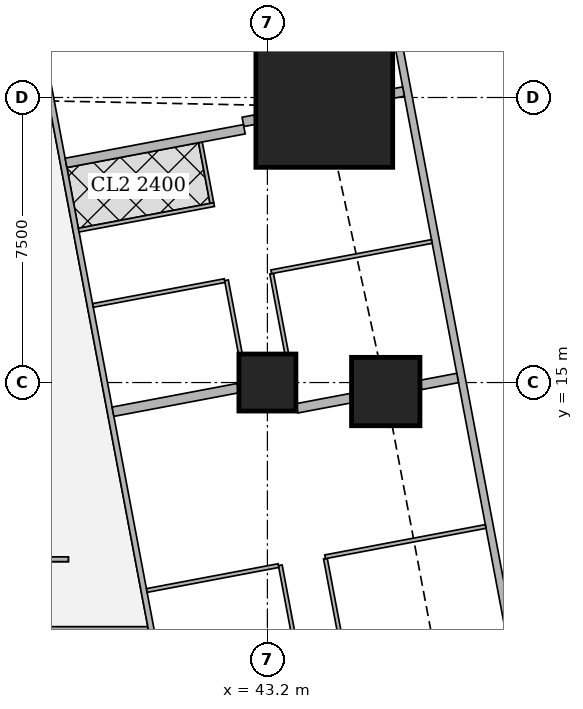
"""IFC4 building model, lengths in metres.
Left out: names, types, materials, properties, quantities, classifications, styles, units other than length and angle.
Written with IfcOpenShell. Run it as: python <this file> out.ifc"""

import sys

from ifc_helpers import new_model, si_unit, direction, frame, frame_2d, origin, origin_2d, place, context, subcontext, project, spatial, rectangle, extrude, element, fill, save


model = new_model("IFC4")
c1 = context("Model", 3, precision=1e-05, world=origin(), true_north=direction((0.0, 1.0)))
c2 = subcontext(c1, "Body", "Model", "MODEL_VIEW")
j1 = project(units=[si_unit("LENGTHUNIT", "METRE"), si_unit("PLANEANGLEUNIT", "RADIAN")], contexts=[c1])
p1 = place(None, origin())
s1 = spatial("IfcSite", under=j1, at=p1, CompositionType="ELEMENT")
p2 = place(p1, origin())
s2 = spatial("IfcBuilding", under=s1, at=p2, CompositionType="ELEMENT")
p3 = place(p2, frame((0.0, 0.0, 139.55)))
s3 = spatial("IfcBuildingStorey", under=s2, at=p3, CompositionType="ELEMENT", Elevation=139.55)
p4 = place(p3, frame((43.2, 15.0, 0.0), z_axis=(0.0, 0.0, 1.0), x_axis=(1.0, 0.0, 0.0)))
e1 = element("IfcColumn", 1, at=p4, inside=s3, PredefinedType="COLUMN", context=c2, shape_type="SweptSolid", body=[
    extrude(rectangle(XDim=1.5, YDim=1.5, at=origin_2d()), origin(), (0.0, 0.0, 1.0), 3.75),
])
p5 = place(p3, frame((46.314, 14.763, 0.0), z_axis=(0.0, 0.0, 1.0), x_axis=(1.0, 0.0, 0.0)))
e2 = element("IfcColumn", 2, at=p5, inside=s3, PredefinedType="COLUMN", context=c2, shape_type="SweptSolid", body=[
    extrude(rectangle(XDim=1.8, YDim=1.8, at=origin_2d()), origin(), (0.0, 0.0, 1.0), 3.75),
])
p6 = place(p3, frame((44.697, 22.263, 0.0), z_axis=(0.0, 0.0, 1.0), x_axis=(1.0, 0.0, 0.0)))
e3 = element("IfcColumn", 3, at=p6, inside=s3, PredefinedType="COLUMN", context=c2, shape_type="SweptSolid", body=[
    extrude(rectangle(XDim=3.6, YDim=3.2, at=origin_2d()), origin(), (0.0, 0.0, 1.0), 3.75),
])
p7 = place(p3, frame((50.653, 2.703, 0.0), z_axis=(0.0, 0.0, 1.0), x_axis=(-0.185612026696, 0.982623109613, 0.0)))
e4 = element("IfcWall", 4, at=p7, inside=s3, PredefinedType="SOLIDWALL", context=c2, shape_type="SweptSolid", body=[
    extrude(rectangle(XDim=41.393, YDim=0.2, at=frame_2d((20.697, 0.0))), origin(), (0.0, 0.0, 1.0), 3.5),
])
p8 = place(p7, frame((1.633, 0.0, 0.9)))
e5 = element("IfcOpeningElement", 5, at=p8, cuts=e4, PredefinedType="OPENING", context=c2, shape_type="SweptSolid", body=[
    extrude(rectangle(XDim=1.8, YDim=1.5, at=frame_2d((0.9, 0.75))), frame((0.0, 0.11, 0.0), z_axis=(0.0, -1.0, 0.0), x_axis=(1.0, 0.0, 0.0)), (0.0, 0.0, 1.0), 0.22),
])
p9 = place(p7, frame((6.032, 0.0, 0.9)))
e6 = element("IfcOpeningElement", 6, at=p9, cuts=e4, PredefinedType="OPENING", context=c2, shape_type="SweptSolid", body=[
    extrude(rectangle(XDim=1.8, YDim=1.5, at=frame_2d((0.9, 0.75))), frame((0.0, 0.11, 0.0), z_axis=(0.0, -1.0, 0.0), x_axis=(1.0, 0.0, 0.0)), (0.0, 0.0, 1.0), 0.22),
])
p10 = place(p7, frame((9.848, 0.0, 0.9)))
e7 = element("IfcOpeningElement", 7, at=p10, cuts=e4, PredefinedType="OPENING", context=c2, shape_type="SweptSolid", body=[
    extrude(rectangle(XDim=1.8, YDim=1.5, at=frame_2d((0.9, 0.75))), frame((0.0, 0.11, 0.0), z_axis=(0.0, -1.0, 0.0), x_axis=(1.0, 0.0, 0.0)), (0.0, 0.0, 1.0), 0.22),
])
p11 = place(p7, frame((13.664, 0.0, 0.9)))
e8 = element("IfcOpeningElement", 8, at=p11, cuts=e4, PredefinedType="OPENING", context=c2, shape_type="SweptSolid", body=[
    extrude(rectangle(XDim=1.8, YDim=1.5, at=frame_2d((0.9, 0.75))), frame((0.0, 0.11, 0.0), z_axis=(0.0, -1.0, 0.0), x_axis=(1.0, 0.0, 0.0)), (0.0, 0.0, 1.0), 0.22),
])
p12 = place(p7, frame((17.481, 0.0, 0.9)))
e9 = element("IfcOpeningElement", 9, at=p12, cuts=e4, PredefinedType="OPENING", context=c2, shape_type="SweptSolid", body=[
    extrude(rectangle(XDim=1.8, YDim=1.5, at=frame_2d((0.9, 0.75))), frame((0.0, 0.11, 0.0), z_axis=(0.0, -1.0, 0.0), x_axis=(1.0, 0.0, 0.0)), (0.0, 0.0, 1.0), 0.22),
])
p13 = place(p7, frame((21.297, 0.0, 0.9)))
e10 = element("IfcOpeningElement", 10, at=p13, cuts=e4, PredefinedType="OPENING", context=c2, shape_type="SweptSolid", body=[
    extrude(rectangle(XDim=1.8, YDim=1.5, at=frame_2d((0.9, 0.75))), frame((0.0, 0.11, 0.0), z_axis=(0.0, -1.0, 0.0), x_axis=(1.0, 0.0, 0.0)), (0.0, 0.0, 1.0), 0.22),
])
p14 = place(p7, frame((25.113, 0.0, 0.9)))
e11 = element("IfcOpeningElement", 11, at=p14, cuts=e4, PredefinedType="OPENING", context=c2, shape_type="SweptSolid", body=[
    extrude(rectangle(XDim=1.8, YDim=1.5, at=frame_2d((0.9, 0.75))), frame((0.0, 0.11, 0.0), z_axis=(0.0, -1.0, 0.0), x_axis=(1.0, 0.0, 0.0)), (0.0, 0.0, 1.0), 0.22),
])
p15 = place(p7, frame((28.93, 0.0, 0.9)))
e12 = element("IfcOpeningElement", 12, at=p15, cuts=e4, PredefinedType="OPENING", context=c2, shape_type="SweptSolid", body=[
    extrude(rectangle(XDim=1.8, YDim=1.5, at=frame_2d((0.9, 0.75))), frame((0.0, 0.11, 0.0), z_axis=(0.0, -1.0, 0.0), x_axis=(1.0, 0.0, 0.0)), (0.0, 0.0, 1.0), 0.22),
])
p16 = place(p7, frame((32.746, 0.0, 0.9)))
e13 = element("IfcOpeningElement", 13, at=p16, cuts=e4, PredefinedType="OPENING", context=c2, shape_type="SweptSolid", body=[
    extrude(rectangle(XDim=1.8, YDim=1.5, at=frame_2d((0.9, 0.75))), frame((0.0, 0.11, 0.0), z_axis=(0.0, -1.0, 0.0), x_axis=(1.0, 0.0, 0.0)), (0.0, 0.0, 1.0), 0.22),
])
p17 = place(p7, frame((36.481, 0.0, 0.9)))
e14 = element("IfcOpeningElement", 14, at=p17, cuts=e4, PredefinedType="OPENING", context=c2, shape_type="SweptSolid", body=[
    extrude(rectangle(XDim=1.8, YDim=1.5, at=frame_2d((0.9, 0.75))), frame((0.0, 0.11, 0.0), z_axis=(0.0, -1.0, 0.0), x_axis=(1.0, 0.0, 0.0)), (0.0, 0.0, 1.0), 0.22),
])
p18 = place(p3, frame((40.053, 8.5, 0.0), z_axis=(0.0, 0.0, 1.0), x_axis=(-1.0, 0.0, 0.0)))
e15 = element("IfcWall", 15, at=p18, inside=s3, PredefinedType="SOLIDWALL", context=c2, shape_type="SweptSolid", body=[
    extrude(rectangle(XDim=31.703, YDim=0.15, at=frame_2d((15.852, 0.0))), origin(), (0.0, 0.0, 1.0), 3.5),
])
p19 = place(p18, frame((28.103, 0.0, 0.0)))
e16 = element("IfcOpeningElement", 16, at=p19, cuts=e15, PredefinedType="OPENING", context=c2, shape_type="SweptSolid", body=[
    extrude(rectangle(XDim=1.0, YDim=2.1, at=frame_2d((0.5, 1.05))), frame((0.0, 0.085, 0.0), z_axis=(0.0, -1.0, 0.0), x_axis=(1.0, 0.0, 0.0)), (0.0, 0.0, 1.0), 0.17),
])
p20 = place(p18, frame((19.853, 0.0, 0.0)))
e17 = element("IfcOpeningElement", 17, at=p20, cuts=e15, PredefinedType="OPENING", context=c2, shape_type="SweptSolid", body=[
    extrude(rectangle(XDim=1.0, YDim=2.1, at=frame_2d((0.5, 1.05))), frame((0.0, 0.085, 0.0), z_axis=(0.0, -1.0, 0.0), x_axis=(1.0, 0.0, 0.0)), (0.0, 0.0, 1.0), 0.17),
])
p21 = place(p18, frame((5.514, 0.0, 0.0)))
e18 = element("IfcOpeningElement", 18, at=p21, cuts=e15, PredefinedType="OPENING", context=c2, shape_type="SweptSolid", body=[
    extrude(rectangle(XDim=1.0, YDim=2.1, at=frame_2d((0.5, 1.05))), frame((0.0, 0.085, 0.0), z_axis=(0.0, -1.0, 0.0), x_axis=(1.0, 0.0, 0.0)), (0.0, 0.0, 1.0), 0.17),
])
p22 = place(p3, frame((33.623, 43.022, 0.0), z_axis=(0.0, 0.0, 1.0), x_axis=(0.185596841028, -0.98262597798, 0.0)))
e19 = element("IfcWall", 19, at=p22, inside=s3, PredefinedType="SOLIDWALL", context=c2, shape_type="SweptSolid", body=[
    extrude(rectangle(XDim=41.66, YDim=0.15, at=frame_2d((20.83, 0.0))), origin(), (0.0, 0.0, 1.0), 2.5),
])
p23 = place(p22, frame((20.242, 0.0, 0.0)))
e20 = element("IfcOpeningElement", 20, at=p23, cuts=e19, PredefinedType="OPENING", context=c2, shape_type="SweptSolid", body=[
    extrude(rectangle(XDim=1.0, YDim=2.1, at=frame_2d((0.5, 1.05))), frame((0.0, 0.085, 0.0), z_axis=(0.0, -1.0, 0.0), x_axis=(1.0, 0.0, 0.0)), (0.0, 0.0, 1.0), 0.17),
])
p24 = place(p22, frame((24.714, 0.0, 0.0)))
e21 = element("IfcOpeningElement", 21, at=p24, cuts=e19, PredefinedType="OPENING", context=c2, shape_type="SweptSolid", body=[
    extrude(rectangle(XDim=1.0, YDim=2.1, at=frame_2d((0.5, 1.05))), frame((0.0, 0.085, 0.0), z_axis=(0.0, -1.0, 0.0), x_axis=(1.0, 0.0, 0.0)), (0.0, 0.0, 1.0), 0.17),
])
p25 = place(p22, frame((31.206, 0.0, 0.0)))
e22 = element("IfcOpeningElement", 22, at=p25, cuts=e19, PredefinedType="OPENING", context=c2, shape_type="SweptSolid", body=[
    extrude(rectangle(XDim=1.0, YDim=2.1, at=frame_2d((0.5, 1.05))), frame((0.0, 0.085, 0.0), z_axis=(0.0, -1.0, 0.0), x_axis=(1.0, 0.0, 0.0)), (0.0, 0.0, 1.0), 0.17),
])
p26 = place(p3, frame((41.437, 21.319, 0.0), z_axis=(0.0, 0.0, 1.0), x_axis=(0.185793689589, -0.982588777113, 0.0)))
e23 = element("IfcWall", 23, at=p26, inside=s3, PredefinedType="PARTITIONING", context=c2, shape_type="SweptSolid", body=[
    extrude(rectangle(XDim=1.625, YDim=0.1, at=frame_2d((0.813, 0.0))), origin(), (0.0, 0.0, 1.0), 3.5),
])
p27 = place(p26, frame((0.325, 0.0, 0.0)))
e24 = element("IfcOpeningElement", 24, at=p27, cuts=e23, PredefinedType="OPENING", context=c2, shape_type="SweptSolid", body=[
    extrude(rectangle(XDim=0.9, YDim=2.1, at=frame_2d((0.45, 1.05))), frame((0.0, 0.06, 0.0), z_axis=(0.0, -1.0, 0.0), x_axis=(1.0, 0.0, 0.0)), (0.0, 0.0, 1.0), 0.12),
])
p28 = place(p3, frame((41.798, 19.682, 0.0), z_axis=(0.0, 0.0, 1.0), x_axis=(-0.982681091817, -0.185304807776, 0.0)))
e25 = element("IfcWall", 25, at=p28, inside=s3, PredefinedType="PARTITIONING", context=c2, shape_type="SweptSolid", body=[
    extrude(rectangle(XDim=3.626, YDim=0.1, at=frame_2d((1.813, 0.0))), origin(), (0.0, 0.0, 1.0), 3.5),
])
p29 = place(p3, frame((43.311, 17.865, 0.0), z_axis=(0.0, 0.0, 1.0), x_axis=(0.185760825203, -0.982594990736, 0.0)))
e26 = element("IfcWall", 26, at=p29, inside=s3, PredefinedType="PARTITIONING", context=c2, shape_type="SweptSolid", body=[
    extrude(rectangle(XDim=2.142, YDim=0.1, at=frame_2d((1.071, 0.0))), origin(), (0.0, 0.0, 1.0), 3.5),
])
p30 = place(p29, frame((0.15, 0.0, 0.0)))
e27 = element("IfcOpeningElement", 27, at=p30, cuts=e26, PredefinedType="OPENING", context=c2, shape_type="SweptSolid", body=[
    extrude(rectangle(XDim=0.9, YDim=2.1, at=frame_2d((0.45, 1.05))), frame((0.0, 0.06, 0.0), z_axis=(0.0, -1.0, 0.0), x_axis=(1.0, 0.0, 0.0)), (0.0, 0.0, 1.0), 0.12),
])
p31 = place(p3, frame((42.123, 17.691, 0.0), z_axis=(0.0, 0.0, 1.0), x_axis=(0.185554843339, -0.982633909507, 0.0)))
e28 = element("IfcWall", 28, at=p31, inside=s3, PredefinedType="PARTITIONING", context=c2, shape_type="SweptSolid", body=[
    extrude(rectangle(XDim=1.967, YDim=0.1, at=frame_2d((0.983, 0.0))), origin(), (0.0, 0.0, 1.0), 3.5),
])
p32 = place(p3, frame((47.527, 18.712, 0.0), z_axis=(0.0, 0.0, 1.0), x_axis=(-0.982633535512, -0.185556823879, 0.0)))
e29 = element("IfcWall", 29, at=p32, inside=s3, PredefinedType="PARTITIONING", context=c2, shape_type="SweptSolid", body=[
    extrude(rectangle(XDim=4.3, YDim=0.1, at=frame_2d((2.15, 0.0))), origin(), (0.0, 0.0, 1.0), 2.1),
])
p33 = place(p3, frame((42.074, 17.682, 0.0), z_axis=(0.0, 0.0, 1.0), x_axis=(-0.982660701716, -0.185412904897, 0.0)))
e30 = element("IfcWall", 30, at=p33, inside=s3, PredefinedType="PARTITIONING", context=c2, shape_type="SweptSolid", body=[
    extrude(rectangle(XDim=3.526, YDim=0.1, at=frame_2d((1.763, 0.0))), origin(), (0.0, 0.0, 1.0), 3.5),
])
p34 = place(p33, frame((1.326, 0.0, 0.0)))
e31 = element("IfcOpeningElement", 31, at=p34, cuts=e30, PredefinedType="OPENING", context=c2, shape_type="SweptSolid", body=[
    extrude(rectangle(XDim=0.9, YDim=2.1, at=frame_2d((0.45, 1.05))), frame((0.0, 0.06, 0.0), z_axis=(0.0, -1.0, 0.0), x_axis=(1.0, 0.0, 0.0)), (0.0, 0.0, 1.0), 0.12),
])
p35 = place(p3, frame((46.782, 22.657, 0.0), z_axis=(0.0, 0.0, 1.0), x_axis=(-0.982104607121, -0.188336243648, 0.0)))
e32 = element("IfcWall", 32, at=p35, inside=s3, PredefinedType="SOLIDWALL", context=c2, shape_type="SweptSolid", body=[
    extrude(rectangle(XDim=0.266, YDim=0.25, at=frame_2d((0.133, 0.0))), origin(), (0.0, 0.0, 1.0), 3.5),
])
p36 = place(p3, frame((42.873, 21.918, 0.0), z_axis=(0.0, 0.0, 1.0), x_axis=(-0.982431406936, -0.186624035603, 0.0)))
e33 = element("IfcWall", 33, at=p36, inside=s3, PredefinedType="SOLIDWALL", context=c2, shape_type="SweptSolid", body=[
    extrude(rectangle(XDim=0.322, YDim=0.25, at=frame_2d((0.161, 0.0))), origin(), (0.0, 0.0, 1.0), 2.5),
])
p37 = place(p3, frame((42.593, 21.665, 0.0), z_axis=(0.0, 0.0, 1.0), x_axis=(-0.982635807605, -0.185544791394, 0.0)))
e34 = element("IfcWall", 34, at=p37, inside=s3, PredefinedType="SOLIDWALL", context=c2, shape_type="SweptSolid", body=[
    extrude(rectangle(XDim=4.775, YDim=0.25, at=frame_2d((2.388, 0.0))), origin(), (0.0, 0.0, 1.0), 2.5),
])
p38 = place(p3, frame((44.727, 10.366, 0.0), z_axis=(0.0, 0.0, 1.0), x_axis=(0.185578957652, -0.982629355595, 0.0)))
e35 = element("IfcWall", 35, at=p38, inside=s3, PredefinedType="PARTITIONING", context=c2, shape_type="SweptSolid", body=[
    extrude(rectangle(XDim=7.721, YDim=0.1, at=frame_2d((3.86, 0.0))), origin(), (0.0, 0.0, 1.0), 3.5),
])
p39 = place(p38, frame((0.151, 0.0, 0.0)))
e36 = element("IfcOpeningElement", 36, at=p39, cuts=e35, PredefinedType="OPENING", context=c2, shape_type="SweptSolid", body=[
    extrude(rectangle(XDim=0.9, YDim=2.1, at=frame_2d((0.45, 1.05))), frame((0.0, 0.06, 0.0), z_axis=(0.0, -1.0, 0.0), x_axis=(1.0, 0.0, 0.0)), (0.0, 0.0, 1.0), 0.12),
])
p40 = place(p38, frame((3.806, 0.0, 0.0)))
e37 = element("IfcOpeningElement", 37, at=p40, cuts=e35, PredefinedType="OPENING", context=c2, shape_type="SweptSolid", body=[
    extrude(rectangle(XDim=0.9, YDim=2.1, at=frame_2d((0.45, 1.05))), frame((0.0, 0.06, 0.0), z_axis=(0.0, -1.0, 0.0), x_axis=(1.0, 0.0, 0.0)), (0.0, 0.0, 1.0), 0.12),
])
p41 = place(p3, frame((43.539, 10.192, 0.0), z_axis=(0.0, 0.0, 1.0), x_axis=(0.18564540894, -0.982616803306, 0.0)))
e38 = element("IfcWall", 38, at=p41, inside=s3, PredefinedType="PARTITIONING", context=c2, shape_type="SweptSolid", body=[
    extrude(rectangle(XDim=1.966, YDim=0.1, at=frame_2d((0.983, 0.0))), origin(), (0.0, 0.0, 1.0), 3.5),
])
p42 = place(p3, frame((48.943, 11.213, 0.0), z_axis=(0.0, 0.0, 1.0), x_axis=(-0.982633535512, -0.185556823879, 0.0)))
e39 = element("IfcWall", 39, at=p42, inside=s3, PredefinedType="PARTITIONING", context=c2, shape_type="SweptSolid", body=[
    extrude(rectangle(XDim=4.3, YDim=0.1, at=frame_2d((2.15, 0.0))), origin(), (0.0, 0.0, 1.0), 2.1),
])
p43 = place(p3, frame((43.49, 10.183, 0.0), z_axis=(0.0, 0.0, 1.0), x_axis=(-0.982588017646, -0.185797706064, 0.0)))
e40 = element("IfcWall", 40, at=p43, inside=s3, PredefinedType="PARTITIONING", context=c2, shape_type="SweptSolid", body=[
    extrude(rectangle(XDim=3.525, YDim=0.1, at=frame_2d((1.763, 0.0))), origin(), (0.0, 0.0, 1.0), 3.5),
])
p44 = place(p43, frame((1.325, 0.0, 0.0)))
e41 = element("IfcOpeningElement", 41, at=p44, cuts=e40, PredefinedType="OPENING", context=c2, shape_type="SweptSolid", body=[
    extrude(rectangle(XDim=0.9, YDim=2.1, at=frame_2d((0.45, 1.05))), frame((0.0, 0.06, 0.0), z_axis=(0.0, -1.0, 0.0), x_axis=(1.0, 0.0, 0.0)), (0.0, 0.0, 1.0), 0.12),
])
p45 = place(p3, frame((48.206, 15.12, 0.0), z_axis=(0.0, 0.0, 1.0), x_axis=(-0.982576361834, -0.185859337043, 0.0)))
e42 = element("IfcWall", 42, at=p45, inside=s3, PredefinedType="SOLIDWALL", context=c2, shape_type="SweptSolid", body=[
    extrude(rectangle(XDim=0.985, YDim=0.25, at=frame_2d((0.493, 0.0))), origin(), (0.0, 0.0, 1.0), 2.1),
])
p46 = place(p3, frame((45.39, 14.588, 0.0), z_axis=(0.0, 0.0, 1.0), x_axis=(-0.982680951688, -0.18530555089, 0.0)))
e43 = element("IfcWall", 43, at=p46, inside=s3, PredefinedType="SOLIDWALL", context=c2, shape_type="SweptSolid", body=[
    extrude(rectangle(XDim=1.435, YDim=0.25, at=frame_2d((0.717, 0.0))), origin(), (0.0, 0.0, 1.0), 2.1),
])
p47 = place(p3, frame((42.426, 14.853, 0.0), z_axis=(0.0, 0.0, 1.0), x_axis=(-0.982633560103, -0.185556693654, 0.0)))
e44 = element("IfcWall", 44, at=p47, inside=s3, PredefinedType="SOLIDWALL", context=c2, shape_type="SweptSolid", body=[
    extrude(rectangle(XDim=3.347, YDim=0.25, at=frame_2d((1.674, 0.0))), origin(), (0.0, 0.0, 1.0), 3.5),
])
p48 = place(p3, frame((28.95, 10.35, 0.0), z_axis=(0.0, 0.0, 1.0), x_axis=(1.0, 0.0, 0.0)))
e45 = element("IfcWall", 45, at=p48, inside=s3, PredefinedType="PARTITIONING", context=c2, shape_type="SweptSolid", body=[
    extrude(rectangle(XDim=9.013, YDim=0.125, at=frame_2d((4.506, 0.0))), origin(), (0.0, 0.0, 1.0), 3.5),
])
p49 = place(p9, origin())
e46 = element("IfcWindow", 46, at=p49, inside=s3, PartitioningType="SINGLE_PANEL", PredefinedType="WINDOW", context=c2, shape_type="SweptSolid", body=[
    extrude(rectangle(XDim=1.8, YDim=1.5, at=frame_2d((0.9, 0.75))), frame((0.0, 0.03, 0.0), z_axis=(0.0, -1.0, 0.0), x_axis=(1.0, 0.0, 0.0)), (0.0, 0.0, 1.0), 0.06),
])
fill(e6, e46)
p50 = place(p10, origin())
e47 = element("IfcWindow", 47, at=p50, inside=s3, PartitioningType="SINGLE_PANEL", PredefinedType="WINDOW", context=c2, shape_type="SweptSolid", body=[
    extrude(rectangle(XDim=1.8, YDim=1.5, at=frame_2d((0.9, 0.75))), frame((0.0, 0.03, 0.0), z_axis=(0.0, -1.0, 0.0), x_axis=(1.0, 0.0, 0.0)), (0.0, 0.0, 1.0), 0.06),
])
fill(e7, e47)
p51 = place(p11, origin())
e48 = element("IfcWindow", 48, at=p51, inside=s3, PartitioningType="SINGLE_PANEL", PredefinedType="WINDOW", context=c2, shape_type="SweptSolid", body=[
    extrude(rectangle(XDim=1.8, YDim=1.5, at=frame_2d((0.9, 0.75))), frame((0.0, 0.03, 0.0), z_axis=(0.0, -1.0, 0.0), x_axis=(1.0, 0.0, 0.0)), (0.0, 0.0, 1.0), 0.06),
])
fill(e8, e48)
p52 = place(p12, origin())
e49 = element("IfcWindow", 49, at=p52, inside=s3, PartitioningType="SINGLE_PANEL", PredefinedType="WINDOW", context=c2, shape_type="SweptSolid", body=[
    extrude(rectangle(XDim=1.8, YDim=1.5, at=frame_2d((0.9, 0.75))), frame((0.0, 0.03, 0.0), z_axis=(0.0, -1.0, 0.0), x_axis=(1.0, 0.0, 0.0)), (0.0, 0.0, 1.0), 0.06),
])
fill(e9, e49)
p53 = place(p13, origin())
e50 = element("IfcWindow", 50, at=p53, inside=s3, PartitioningType="SINGLE_PANEL", PredefinedType="WINDOW", context=c2, shape_type="SweptSolid", body=[
    extrude(rectangle(XDim=1.8, YDim=1.5, at=frame_2d((0.9, 0.75))), frame((0.0, 0.03, 0.0), z_axis=(0.0, -1.0, 0.0), x_axis=(1.0, 0.0, 0.0)), (0.0, 0.0, 1.0), 0.06),
])
fill(e10, e50)
p54 = place(p23, origin())
e51 = element("IfcDoor", 51, at=p54, inside=s3, OperationType="SINGLE_SWING_RIGHT", PredefinedType="DOOR", context=c2, shape_type="SweptSolid", body=[
    extrude(rectangle(XDim=1.0, YDim=2.1, at=frame_2d((0.5, 1.05))), frame((0.0, 0.025, 0.0), z_axis=(0.0, -1.0, 0.0), x_axis=(1.0, 0.0, 0.0)), (0.0, 0.0, 1.0), 0.05),
])
fill(e20, e51)
p55 = place(p27, origin())
e52 = element("IfcDoor", 52, at=p55, inside=s3, OperationType="SINGLE_SWING_RIGHT", PredefinedType="DOOR", context=c2, shape_type="SweptSolid", body=[
    extrude(rectangle(XDim=0.9, YDim=2.1, at=frame_2d((0.45, 1.05))), frame((0.0, 0.025, 0.0), z_axis=(0.0, -1.0, 0.0), x_axis=(1.0, 0.0, 0.0)), (0.0, 0.0, 1.0), 0.05),
])
fill(e24, e52)
p56 = place(p30, origin())
e53 = element("IfcDoor", 53, at=p56, inside=s3, OperationType="SINGLE_SWING_LEFT", PredefinedType="DOOR", context=c2, shape_type="SweptSolid", body=[
    extrude(rectangle(XDim=0.9, YDim=2.1, at=frame_2d((0.45, 1.05))), frame((0.0, 0.025, 0.0), z_axis=(0.0, -1.0, 0.0), x_axis=(1.0, 0.0, 0.0)), (0.0, 0.0, 1.0), 0.05),
])
fill(e27, e53)
p57 = place(p24, origin())
e54 = element("IfcDoor", 54, at=p57, inside=s3, OperationType="SINGLE_SWING_LEFT", PredefinedType="DOOR", context=c2, shape_type="SweptSolid", body=[
    extrude(rectangle(XDim=1.0, YDim=2.1, at=frame_2d((0.5, 1.05))), frame((0.0, 0.025, 0.0), z_axis=(0.0, -1.0, 0.0), x_axis=(1.0, 0.0, 0.0)), (0.0, 0.0, 1.0), 0.05),
])
fill(e21, e54)
p58 = place(p39, origin())
e55 = element("IfcDoor", 55, at=p58, inside=s3, OperationType="SINGLE_SWING_LEFT", PredefinedType="DOOR", context=c2, shape_type="SweptSolid", body=[
    extrude(rectangle(XDim=0.9, YDim=2.1, at=frame_2d((0.45, 1.05))), frame((0.0, 0.025, 0.0), z_axis=(0.0, -1.0, 0.0), x_axis=(1.0, 0.0, 0.0)), (0.0, 0.0, 1.0), 0.05),
])
fill(e36, e55)
p59 = place(p25, origin())
e56 = element("IfcDoor", 56, at=p59, inside=s3, OperationType="SINGLE_SWING_LEFT", PredefinedType="DOOR", context=c2, shape_type="SweptSolid", body=[
    extrude(rectangle(XDim=1.0, YDim=2.1, at=frame_2d((0.5, 1.05))), frame((0.0, 0.025, 0.0), z_axis=(0.0, -1.0, 0.0), x_axis=(1.0, 0.0, 0.0)), (0.0, 0.0, 1.0), 0.05),
])
fill(e22, e56)
p60 = place(p44, origin())
e57 = element("IfcDoor", 57, at=p60, inside=s3, OperationType="SINGLE_SWING_LEFT", PredefinedType="DOOR", context=c2, shape_type="SweptSolid", body=[
    extrude(rectangle(XDim=0.9, YDim=2.1, at=frame_2d((0.45, 1.05))), frame((0.0, 0.025, 0.0), z_axis=(0.0, -1.0, 0.0), x_axis=(1.0, 0.0, 0.0)), (0.0, 0.0, 1.0), 0.05),
])
fill(e41, e57)
p61 = place(p34, origin())
e58 = element("IfcDoor", 58, at=p61, inside=s3, OperationType="SINGLE_SWING_RIGHT", PredefinedType="DOOR", context=c2, shape_type="SweptSolid", body=[
    extrude(rectangle(XDim=0.9, YDim=2.1, at=frame_2d((0.45, 1.05))), frame((0.0, 0.025, 0.0), z_axis=(0.0, -1.0, 0.0), x_axis=(1.0, 0.0, 0.0)), (0.0, 0.0, 1.0), 0.05),
])
fill(e31, e58)
save(model, sys.argv[1])
